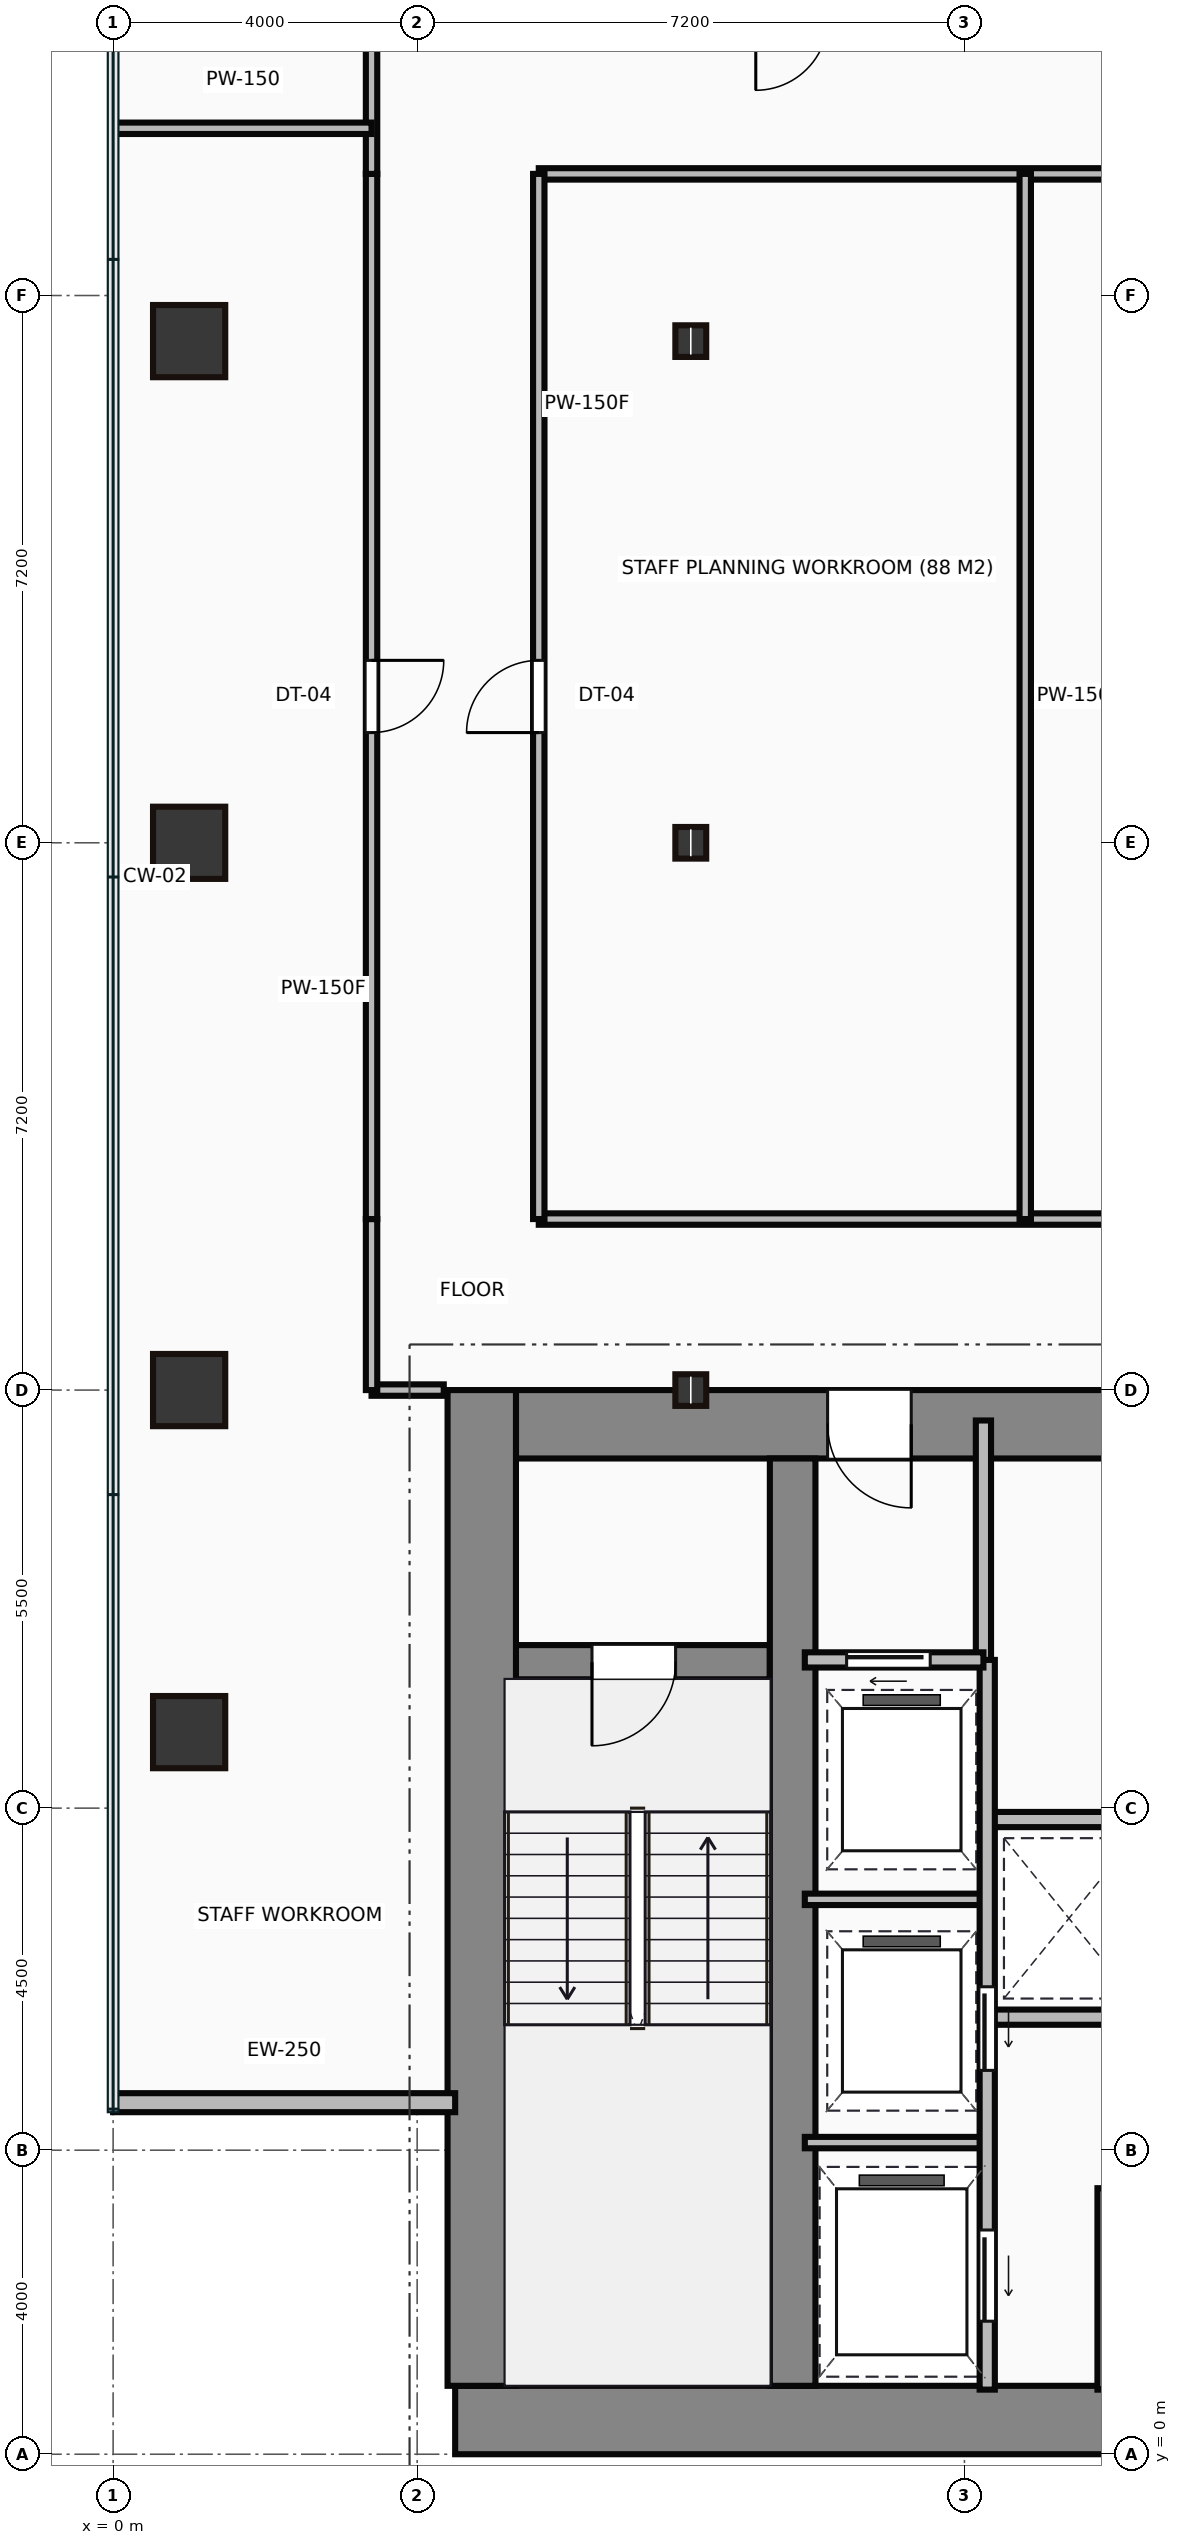
"""IFC4 building model, lengths in metres.
Left out: names, types, materials, properties, quantities, classifications, styles, units other than length and angle.
Written with IfcOpenShell. Run it as: python <this file> out.ifc"""

import sys

from ifc_helpers import new_model, si_unit, direction, frame, frame_2d, origin, origin_2d, place, context, subcontext, project, spatial, rectangle, hollow_rectangle, i_section, extrude, source, transform, mapped, element, fill, save


model = new_model("IFC4")
c1 = context("Model", 3, precision=1e-05, world=origin(), true_north=direction((0.0, 1.0)))
c2 = subcontext(c1, "Body", "Model", "MODEL_VIEW")
j1 = project(units=[si_unit("LENGTHUNIT", "METRE"), si_unit("PLANEANGLEUNIT", "RADIAN")], contexts=[c1])
p1 = place(None, origin())
s1 = spatial("IfcSite", under=j1, at=p1, CompositionType="ELEMENT")
p2 = place(p1, origin())
s2 = spatial("IfcBuilding", under=s1, at=p2, CompositionType="ELEMENT")
p3 = place(p2, frame((0.0, 0.0, 65.35)))
s3 = spatial("IfcBuildingStorey", under=s2, at=p3, CompositionType="ELEMENT", Elevation=65.35)
m1 = source(origin(), c2, "Body", "SweptSolid", [
    extrude(rectangle(XDim=29.5, YDim=0.9, at=frame_2d((14.75, 0.0))), origin(), (0.0, 0.0, 1.0), 3.65),
])
p4 = place(p3, frame((4.5, 0.45, 0.0), z_axis=(0.0, 0.0, 1.0), x_axis=(1.0, 0.0, 0.0)))
e1 = element("IfcWall", 1, at=p4, inside=s3, PredefinedType="SHEAR", context=c2, shape_type="MappedRepresentation", body=[
    mapped(m1, transform((0.0, 0.0, 0.0))),
])
m2 = source(origin(), c2, "Body", "SweptSolid", [
    extrude(rectangle(XDim=13.1, YDim=0.9, at=frame_2d((6.55, 0.0))), origin(), (0.0, 0.0, 1.0), 3.65),
])
p5 = place(p3, frame((4.85, 0.9, 0.0), z_axis=(0.0, 0.0, 1.0), x_axis=(0.0, 1.0, 0.0)))
e2 = element("IfcWall", 2, at=p5, inside=s3, PredefinedType="SHEAR", context=c2, shape_type="MappedRepresentation", body=[
    mapped(m2, transform((0.0, 0.0, 0.0))),
])
m3 = source(origin(), c2, "Body", "SweptSolid", [
    extrude(rectangle(XDim=9.1, YDim=0.9, at=frame_2d((4.55, 0.0))), origin(), (0.0, 0.0, 1.0), 3.65),
])
p6 = place(p3, frame((5.3, 13.55, 0.0), z_axis=(0.0, 0.0, 1.0), x_axis=(1.0, 0.0, 0.0)))
e3 = element("IfcWall", 3, at=p6, inside=s3, PredefinedType="SHEAR", context=c2, shape_type="MappedRepresentation", body=[
    mapped(m3, transform((0.0, 0.0, 0.0))),
])
p7 = place(p6, frame((4.1, 0.0, 0.0)))
e4 = element("IfcOpeningElement", 4, at=p7, cuts=e3, PredefinedType="OPENING", context=c2, shape_type="SweptSolid", body=[
    extrude(rectangle(XDim=1.1, YDim=2.15, at=frame_2d((0.55, 1.075))), frame((0.0, 0.46, 0.0), z_axis=(0.0, -1.0, 0.0), x_axis=(1.0, 0.0, 0.0)), (0.0, 0.0, 1.0), 0.92),
])
m4 = source(origin(), c2, "Body", "SweptSolid", [
    extrude(rectangle(XDim=12.2, YDim=0.6, at=frame_2d((6.1, 0.0))), origin(), (0.0, 0.0, 1.0), 3.65),
])
p8 = place(p3, frame((8.94, 0.9, 0.0), z_axis=(0.0, 0.0, 1.0), x_axis=(0.0, 1.0, 0.0)))
e5 = element("IfcWall", 5, at=p8, inside=s3, PredefinedType="SHEAR", context=c2, shape_type="MappedRepresentation", body=[
    mapped(m4, transform((0.0, 0.0, 0.0))),
])
m5 = source(origin(), c2, "Body", "SweptSolid", [
    extrude(rectangle(XDim=3.39, YDim=0.45, at=frame_2d((1.695, 0.0))), origin(), (0.0, 0.0, 1.0), 3.65),
])
p9 = place(p3, frame((5.25, 10.42, 0.0), z_axis=(0.0, 0.0, 1.0), x_axis=(1.0, 0.0, 0.0)))
e6 = element("IfcWall", 6, at=p9, inside=s3, PredefinedType="SHEAR", context=c2, shape_type="MappedRepresentation", body=[
    mapped(m5, transform((0.0, 0.0, 0.0))),
])
p10 = place(p9, frame((1.05, 0.0, 0.0)))
e7 = element("IfcOpeningElement", 7, at=p10, cuts=e6, PredefinedType="OPENING", context=c2, shape_type="SweptSolid", body=[
    extrude(rectangle(XDim=1.1, YDim=2.15, at=frame_2d((0.55, 1.075))), frame((0.0, 0.235, 0.0), z_axis=(0.0, -1.0, 0.0), x_axis=(1.0, 0.0, 0.0)), (0.0, 0.0, 1.0), 0.47),
])
m6 = source(origin(), c2, "Body", "SweptSolid", [
    extrude(hollow_rectangle(XDim=0.95, YDim=0.95, WallThickness=0.045, at=origin_2d()), origin(), (0.0, 0.0, 1.0), 3.65),
])
for number, where, z_axis, x_axis in (
    (8, (1.0, 9.5, 0.0), (0.0, 0.0, 1.0), (1.0, 0.0, 0.0)),
    (9, (1.0, 14.0, 0.0), (0.0, 0.0, 1.0), (1.0, 0.0, 0.0)),
    (10, (1.0, 21.2, 0.0), (0.0, 0.0, 1.0), (1.0, 0.0, 0.0)),
    (11, (1.0, 27.8, 0.0), (0.0, 0.0, 1.0), (1.0, 0.0, 0.0)),
):
    element("IfcColumn", number, at=place(p3, frame(where, z_axis=z_axis, x_axis=x_axis)), inside=s3, PredefinedType="COLUMN", context=c2, shape_type="MappedRepresentation", body=[
        mapped(m6, transform((0.0, 0.0, 0.0))),
    ])
m7 = source(origin(), c2, "Body", "SweptSolid", [
    extrude(i_section(OverallWidth=0.406, OverallDepth=0.416, WebThickness=0.03, FlangeThickness=0.048, at=origin_2d()), origin(), (0.0, 0.0, 1.0), 3.65),
])
for number, where, z_axis, x_axis in (
    (12, (7.6, 14.0, 0.0), (0.0, 0.0, 1.0), (1.0, 0.0, 0.0)),
    (13, (7.6, 21.2, 0.0), (0.0, 0.0, 1.0), (1.0, 0.0, 0.0)),
    (14, (7.6, 27.8, 0.0), (0.0, 0.0, 1.0), (1.0, 0.0, 0.0)),
):
    element("IfcColumn", number, at=place(p3, frame(where, z_axis=z_axis, x_axis=x_axis)), inside=s3, PredefinedType="COLUMN", context=c2, shape_type="MappedRepresentation", body=[
        mapped(m7, transform((0.0, 0.0, 0.0))),
    ])
m8 = source(origin(), c2, "Body", "SweptSolid", [
    extrude(rectangle(XDim=4.5, YDim=0.25, at=frame_2d((2.25, 0.0))), origin(), (0.0, 0.0, 1.0), 3.4),
])
p11 = place(p3, frame((0.0, 4.625, 0.0), z_axis=(0.0, 0.0, 1.0), x_axis=(1.0, 0.0, 0.0)))
e15 = element("IfcWall", 15, at=p11, inside=s3, PredefinedType="STANDARD", context=c2, shape_type="MappedRepresentation", body=[
    mapped(m8, transform((0.0, 0.0, 0.0))),
])
m9 = source(origin(), c2, "Body", "SweptSolid", [
    extrude(rectangle(XDim=3.18, YDim=0.2, at=frame_2d((1.59, 0.0))), origin(), (0.0, 0.0, 1.0), 3.4),
])
p12 = place(p3, frame((11.45, 10.42, 0.0), z_axis=(0.0, 0.0, 1.0), x_axis=(0.0, 1.0, 0.0)))
e16 = element("IfcWall", 16, at=p12, inside=s3, PredefinedType="PARTITIONING", context=c2, shape_type="MappedRepresentation", body=[
    mapped(m9, transform((0.0, 0.0, 0.0))),
])
m10 = source(origin(), c2, "Body", "SweptSolid", [
    extrude(rectangle(XDim=2.35, YDim=0.2, at=frame_2d((1.175, 0.0))), origin(), (0.0, 0.0, 1.0), 3.4),
])
p13 = place(p3, frame((9.1, 10.45, 0.0), z_axis=(0.0, 0.0, 1.0), x_axis=(1.0, 0.0, 0.0)))
e17 = element("IfcWall", 17, at=p13, inside=s3, PredefinedType="PARTITIONING", context=c2, shape_type="MappedRepresentation", body=[
    mapped(m10, transform((0.0, 0.0, 0.0))),
])
p14 = place(p13, frame((0.55, 0.0, 0.0)))
e18 = element("IfcOpeningElement", 18, at=p14, cuts=e17, PredefinedType="OPENING", context=c2, shape_type="SweptSolid", body=[
    extrude(rectangle(XDim=1.1, YDim=2.15, at=frame_2d((0.55, 1.075))), frame((0.0, 0.11, 0.0), z_axis=(0.0, -1.0, 0.0), x_axis=(1.0, 0.0, 0.0)), (0.0, 0.0, 1.0), 0.22),
])
m11 = source(origin(), c2, "Body", "SweptSolid", [
    extrude(rectangle(XDim=9.6, YDim=0.2, at=frame_2d((4.8, 0.0))), origin(), (0.0, 0.0, 1.0), 3.4),
])
p15 = place(p3, frame((11.5, 0.85, 0.0), z_axis=(0.0, 0.0, 1.0), x_axis=(0.0, 1.0, 0.0)))
e19 = element("IfcWall", 19, at=p15, inside=s3, PredefinedType="PARTITIONING", context=c2, shape_type="MappedRepresentation", body=[
    mapped(m11, transform((0.0, 0.0, 0.0))),
])
p16 = place(p15, frame((4.2, 0.0, 0.0)))
e20 = element("IfcOpeningElement", 20, at=p16, cuts=e19, PredefinedType="OPENING", context=c2, shape_type="SweptSolid", body=[
    extrude(rectangle(XDim=1.1, YDim=2.15, at=frame_2d((0.55, 1.075))), frame((0.0, 0.11, 0.0), z_axis=(0.0, -1.0, 0.0), x_axis=(1.0, 0.0, 0.0)), (0.0, 0.0, 1.0), 0.22),
])
p17 = place(p15, frame((0.9, 0.0, 0.0)))
e21 = element("IfcOpeningElement", 21, at=p17, cuts=e19, PredefinedType="OPENING", context=c2, shape_type="SweptSolid", body=[
    extrude(rectangle(XDim=1.2, YDim=2.15, at=frame_2d((0.6, 1.075))), frame((0.0, 0.11, 0.0), z_axis=(0.0, -1.0, 0.0), x_axis=(1.0, 0.0, 0.0)), (0.0, 0.0, 1.0), 0.22),
])
m12 = source(origin(), c2, "Body", "SweptSolid", [
    extrude(rectangle(XDim=2.4, YDim=0.15, at=frame_2d((1.2, 0.0))), origin(), (0.0, 0.0, 1.0), 3.4),
])
for number, where, z_axis, x_axis in (
    (22, (9.1, 4.1, 0.0), (0.0, 0.0, 1.0), (1.0, 0.0, 0.0)),
    (23, (9.1, 7.3, 0.0), (0.0, 0.0, 1.0), (1.0, 0.0, 0.0)),
):
    element("IfcWall", number, at=place(p3, frame(where, z_axis=z_axis, x_axis=x_axis)), inside=s3, PredefinedType="PARTITIONING", context=c2, shape_type="MappedRepresentation", body=[
        mapped(m12, transform((0.0, 0.0, 0.0))),
    ])
m13 = source(origin(), c2, "Body", "SweptSolid", [
    extrude(rectangle(XDim=2.65, YDim=0.2, at=frame_2d((1.325, 0.0))), origin(), (0.0, 0.0, 1.0), 3.4),
])
p18 = place(p3, frame((13.05, 0.85, 0.0), z_axis=(0.0, 0.0, 1.0), x_axis=(0.0, 1.0, 0.0)))
e24 = element("IfcWall", 24, at=p18, inside=s3, PredefinedType="PARTITIONING", context=c2, shape_type="MappedRepresentation", body=[
    mapped(m13, transform((0.0, 0.0, 0.0))),
])
m14 = source(origin(), c2, "Body", "SweptSolid", [
    extrude(rectangle(XDim=11.85, YDim=0.2, at=frame_2d((5.925, 0.0))), origin(), (0.0, 0.0, 1.0), 3.4),
])
for number, where, z_axis, x_axis in (
    (25, (11.55, 5.75, 0.0), (0.0, 0.0, 1.0), (1.0, 0.0, 0.0)),
    (26, (11.55, 8.35, 0.0), (0.0, 0.0, 1.0), (1.0, 0.0, 0.0)),
):
    element("IfcWall", number, at=place(p3, frame(where, z_axis=z_axis, x_axis=x_axis)), inside=s3, PredefinedType="PARTITIONING", context=c2, shape_type="MappedRepresentation", body=[
        mapped(m14, transform((0.0, 0.0, 0.0))),
    ])
m15 = source(origin(), c2, "Body", "SweptSolid", [
    extrude(rectangle(XDim=0.95, YDim=0.15, at=frame_2d((0.475, 0.0))), origin(), (0.0, 0.0, 1.0), 2.625),
])
p19 = place(p3, frame((4.35, 14.0, 0.0), z_axis=(0.0, 0.0, 1.0), x_axis=(-1.0, 0.0, 0.0)))
e27 = element("IfcWall", 27, at=p19, inside=s3, PredefinedType="PARTITIONING", context=c2, shape_type="MappedRepresentation", body=[
    mapped(m15, transform((0.0, 0.0, 0.0))),
])
m16 = source(origin(), c2, "Body", "SweptSolid", [
    extrude(rectangle(XDim=2.25, YDim=0.15, at=frame_2d((1.125, 0.0))), origin(), (0.0, 0.0, 1.0), 3.4),
])
p20 = place(p3, frame((3.4, 14.0, 0.0), z_axis=(0.0, 0.0, 1.0), x_axis=(0.0, 1.0, 0.0)))
e28 = element("IfcWall", 28, at=p20, inside=s3, PredefinedType="PARTITIONING", context=c2, shape_type="MappedRepresentation", body=[
    mapped(m16, transform((0.0, 0.0, 0.0))),
])
m17 = source(origin(), c2, "Body", "SweptSolid", [
    extrude(rectangle(XDim=13.75, YDim=0.15, at=frame_2d((6.875, 0.0))), origin(), (0.0, 0.0, 1.0), 3.4),
])
p21 = place(p3, frame((3.4, 16.25, 0.0), z_axis=(0.0, 0.0, 1.0), x_axis=(0.0, 1.0, 0.0)))
e29 = element("IfcWall", 29, at=p21, inside=s3, PredefinedType="PARTITIONING", context=c2, shape_type="MappedRepresentation", body=[
    mapped(m17, transform((0.0, 0.0, 0.0))),
])
p22 = place(p21, frame((6.4, 0.0, 0.0)))
e30 = element("IfcOpeningElement", 30, at=p22, cuts=e29, PredefinedType="OPENING", context=c2, shape_type="SweptSolid", body=[
    extrude(rectangle(XDim=0.95, YDim=2.15, at=frame_2d((0.475, 1.075))), frame((0.0, 0.085, 0.0), z_axis=(0.0, -1.0, 0.0), x_axis=(1.0, 0.0, 0.0)), (0.0, 0.0, 1.0), 0.17),
])
m18 = source(origin(), c2, "Body", "SweptSolid", [
    extrude(rectangle(XDim=2.05, YDim=0.15, at=frame_2d((1.025, 0.0))), origin(), (0.0, 0.0, 1.0), 3.4),
])
p23 = place(p3, frame((3.4, 30.0, 0.0), z_axis=(0.0, 0.0, 1.0), x_axis=(0.0, 1.0, 0.0)))
e31 = element("IfcWall", 31, at=p23, inside=s3, PredefinedType="PARTITIONING", context=c2, shape_type="MappedRepresentation", body=[
    mapped(m18, transform((0.0, 0.0, 0.0))),
])
m19 = source(origin(), c2, "Body", "SweptSolid", [
    extrude(rectangle(XDim=31.6, YDim=0.15, at=frame_2d((15.8, 0.0))), origin(), (0.0, 0.0, 1.0), 3.4),
])
p24 = place(p3, frame((5.6, 16.25, 0.0), z_axis=(0.0, 0.0, 1.0), x_axis=(1.0, 0.0, 0.0)))
e32 = element("IfcWall", 32, at=p24, inside=s3, PredefinedType="PARTITIONING", context=c2, shape_type="MappedRepresentation", body=[
    mapped(m19, transform((0.0, 0.0, 0.0))),
])
p25 = place(p24, frame((10.125, 0.0, 0.0)))
e33 = element("IfcOpeningElement", 33, at=p25, cuts=e32, PredefinedType="OPENING", context=c2, shape_type="SweptSolid", body=[
    extrude(rectangle(XDim=0.95, YDim=2.15, at=frame_2d((0.475, 1.075))), frame((0.0, 0.085, 0.0), z_axis=(0.0, -1.0, 0.0), x_axis=(1.0, 0.0, 0.0)), (0.0, 0.0, 1.0), 0.17),
])
p26 = place(p24, frame((18.925, 0.0, 0.0)))
e34 = element("IfcOpeningElement", 34, at=p26, cuts=e32, PredefinedType="OPENING", context=c2, shape_type="SweptSolid", body=[
    extrude(rectangle(XDim=0.95, YDim=2.15, at=frame_2d((0.475, 1.075))), frame((0.0, 0.085, 0.0), z_axis=(0.0, -1.0, 0.0), x_axis=(1.0, 0.0, 0.0)), (0.0, 0.0, 1.0), 0.17),
])
m20 = source(origin(), c2, "Body", "SweptSolid", [
    extrude(rectangle(XDim=31.6, YDim=0.15, at=frame_2d((15.8, 0.0))), origin(), (0.0, 0.0, 1.0), 2.978),
])
p27 = place(p3, frame((37.2, 30.0, 0.0), z_axis=(0.0, 0.0, 1.0), x_axis=(-1.0, 0.0, 0.0)))
e35 = element("IfcWall", 35, at=p27, inside=s3, PredefinedType="PARTITIONING", context=c2, shape_type="MappedRepresentation", body=[
    mapped(m20, transform((0.0, 0.0, 0.0))),
])
p28 = place(p3, frame((5.6, 30.0, 0.0), z_axis=(0.0, 0.0, 1.0), x_axis=(0.0, -1.0, 0.0)))
e36 = element("IfcWall", 36, at=p28, inside=s3, PredefinedType="PARTITIONING", context=c2, shape_type="MappedRepresentation", body=[
    mapped(m17, transform((0.0, 0.0, 0.0))),
])
p29 = place(p28, frame((6.4, 0.0, 0.0)))
e37 = element("IfcOpeningElement", 37, at=p29, cuts=e36, PredefinedType="OPENING", context=c2, shape_type="SweptSolid", body=[
    extrude(rectangle(XDim=0.95, YDim=2.15, at=frame_2d((0.475, 1.075))), frame((0.0, 0.085, 0.0), z_axis=(0.0, -1.0, 0.0), x_axis=(1.0, 0.0, 0.0)), (0.0, 0.0, 1.0), 0.17),
])
m21 = source(origin(), c2, "Body", "SweptSolid", [
    extrude(rectangle(XDim=3.38, YDim=0.15, at=frame_2d((1.69, 0.0))), origin(), (0.0, 0.0, 1.0), 3.4),
])
p30 = place(p3, frame((0.02, 30.6, 0.0), z_axis=(0.0, 0.0, 1.0), x_axis=(1.0, 0.0, 0.0)))
e38 = element("IfcWall", 38, at=p30, inside=s3, PredefinedType="PARTITIONING", context=c2, shape_type="MappedRepresentation", body=[
    mapped(m21, transform((0.0, 0.0, 0.0))),
])
p31 = place(p3, frame((12.0, 30.0, 0.0), z_axis=(0.0, 0.0, 1.0), x_axis=(0.0, -1.0, 0.0)))
e39 = element("IfcWall", 39, at=p31, inside=s3, PredefinedType="PARTITIONING", context=c2, shape_type="MappedRepresentation", body=[
    mapped(m17, transform((0.0, 0.0, 0.0))),
])
m22 = source(origin(), c2, "Body", "SweptSolid", [
    extrude(rectangle(XDim=1.1, YDim=2.15, at=frame_2d((0.55, 1.075))), frame((0.0, 0.025, 0.0), z_axis=(0.0, -1.0, 0.0), x_axis=(1.0, 0.0, 0.0)), (0.0, 0.0, 1.0), 0.05),
])
p32 = place(p10, frame((1.1, 0.0, 0.0), z_axis=(0.0, 0.0, 1.0), x_axis=(-1.0, 0.0, 0.0)))
e40 = element("IfcDoor", 40, at=p32, inside=s3, OperationType="SINGLE_SWING_LEFT", PredefinedType="DOOR", context=c2, shape_type="MappedRepresentation", body=[
    mapped(m22, transform((0.0, 0.0, 0.0))),
])
fill(e7, e40)
p33 = place(p7, origin())
e41 = element("IfcDoor", 41, at=p33, inside=s3, OperationType="SINGLE_SWING_RIGHT", PredefinedType="DOOR", context=c2, shape_type="MappedRepresentation", body=[
    mapped(m22, transform((0.0, 0.0, 0.0))),
])
fill(e4, e41)
p34 = place(p14, origin())
e42 = element("IfcDoor", 42, at=p34, inside=s3, OperationType="SLIDING_TO_LEFT", PredefinedType="DOOR", context=c2, shape_type="MappedRepresentation", body=[
    mapped(m22, transform((0.0, 0.0, 0.0))),
])
fill(e18, e42)
p35 = place(p16, frame((1.1, 0.0, 0.0), z_axis=(0.0, 0.0, 1.0), x_axis=(-1.0, 0.0, 0.0)))
e43 = element("IfcDoor", 43, at=p35, inside=s3, OperationType="SLIDING_TO_LEFT", PredefinedType="DOOR", context=c2, shape_type="MappedRepresentation", body=[
    mapped(m22, transform((0.0, 0.0, 0.0))),
])
fill(e20, e43)
m23 = source(origin(), c2, "Body", "SweptSolid", [
    extrude(rectangle(XDim=1.2, YDim=2.15, at=frame_2d((0.6, 1.075))), frame((0.0, 0.025, 0.0), z_axis=(0.0, -1.0, 0.0), x_axis=(1.0, 0.0, 0.0)), (0.0, 0.0, 1.0), 0.05),
])
p36 = place(p17, frame((1.2, 0.0, 0.0), z_axis=(0.0, 0.0, 1.0), x_axis=(-1.0, 0.0, 0.0)))
e44 = element("IfcDoor", 44, at=p36, inside=s3, OperationType="SLIDING_TO_LEFT", PredefinedType="DOOR", context=c2, shape_type="MappedRepresentation", body=[
    mapped(m23, transform((0.0, 0.0, 0.0))),
])
fill(e21, e44)
m24 = source(origin(), c2, "Body", "SweptSolid", [
    extrude(rectangle(XDim=0.95, YDim=2.15, at=frame_2d((0.475, 1.075))), frame((0.0, 0.025, 0.0), z_axis=(0.0, -1.0, 0.0), x_axis=(1.0, 0.0, 0.0)), (0.0, 0.0, 1.0), 0.05),
])
p37 = place(p22, origin())
e45 = element("IfcDoor", 45, at=p37, inside=s3, OperationType="SINGLE_SWING_RIGHT", PredefinedType="DOOR", context=c2, shape_type="MappedRepresentation", body=[
    mapped(m24, transform((0.0, 0.0, 0.0))),
])
fill(e30, e45)
p38 = place(p29, origin())
e46 = element("IfcDoor", 46, at=p38, inside=s3, OperationType="SINGLE_SWING_RIGHT", PredefinedType="DOOR", context=c2, shape_type="MappedRepresentation", body=[
    mapped(m24, transform((0.0, 0.0, 0.0))),
])
fill(e37, e46)
save(model, sys.argv[1])
